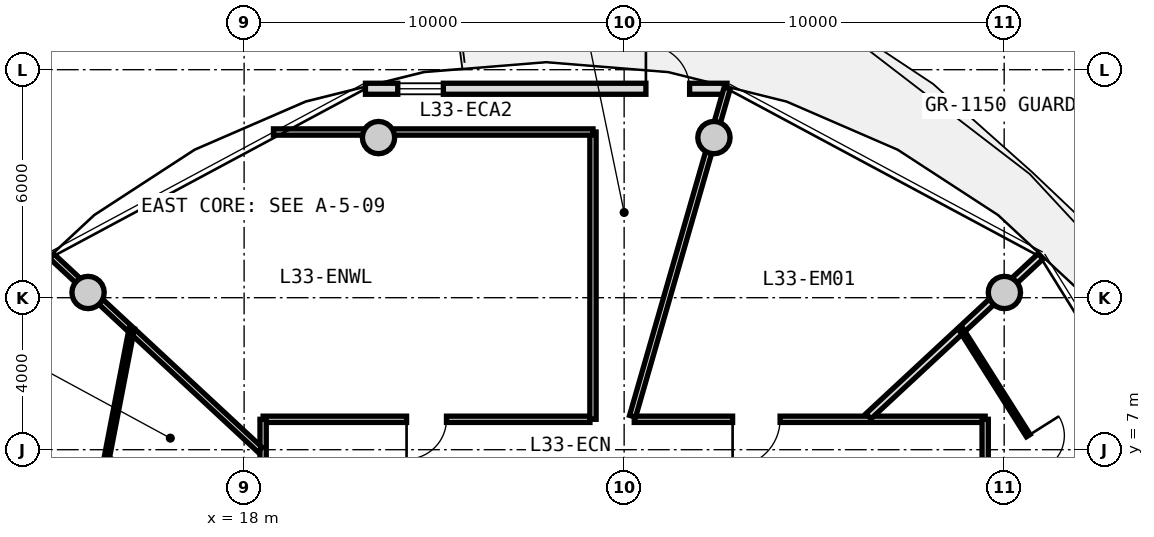
"""IFC4 building model, lengths in metres.
Left out: names, types, materials, properties, quantities, classifications, styles, units other than length and angle.
Written with IfcOpenShell. Run it as: python <this file> out.ifc"""

import sys

from ifc_helpers import new_model, si_unit, direction, frame, frame_2d, origin, origin_2d, place, context, subcontext, project, spatial, rectangle, circle, extrude, source, transform, mapped, element, fill, save


model = new_model("IFC4")
c1 = context("Model", 3, precision=1e-05, world=origin(), true_north=direction((0.0, 1.0)))
c2 = subcontext(c1, "Body", "Model", "MODEL_VIEW")
j1 = project(units=[si_unit("LENGTHUNIT", "METRE"), si_unit("PLANEANGLEUNIT", "RADIAN")], contexts=[c1])
p1 = place(None, origin())
s1 = spatial("IfcSite", under=j1, at=p1, CompositionType="ELEMENT")
p2 = place(p1, origin())
s2 = spatial("IfcBuilding", under=s1, at=p2, CompositionType="ELEMENT")
p3 = place(p2, frame((0.0, 0.0, 108.45)))
s3 = spatial("IfcBuildingStorey", under=s2, at=p3, CompositionType="ELEMENT", Elevation=108.45)
m1 = source(origin(), c2, "Body", "SweptSolid", [
    extrude(circle(Radius=0.425, at=origin_2d()), origin(), (0.0, 0.0, 1.0), 3.05),
])
for number, where, z_axis, x_axis in (
    (1, (38.006, 11.137, 0.0), (0.0, 0.0, 1.0), (1.0, 0.0, 0.0)),
    (2, (30.363, 15.213, 0.0), (0.0, 0.0, 1.0), (1.0, 0.0, 0.0)),
    (3, (21.537, 15.213, 0.0), (0.0, 0.0, 1.0), (1.0, 0.0, 0.0)),
    (4, (13.894, 11.137, 0.0), (0.0, 0.0, 1.0), (1.0, 0.0, 0.0)),
):
    element("IfcColumn", number, at=place(p3, frame(where, z_axis=z_axis, x_axis=x_axis)), inside=s3, PredefinedType="COLUMN", context=c2, shape_type="MappedRepresentation", body=[
        mapped(m1, transform((0.0, 0.0, 0.0), x_axis=(1.0, 0.0, 0.0), y_axis=(0.0, 1.0, 0.0), z_axis=(0.0, 0.0, 1.0), scale=1.0)),
    ])
m2 = source(origin(), c2, "Body", "SweptSolid", [
    extrude(rectangle(XDim=9.514, YDim=0.29, at=frame_2d((4.757, 0.0))), origin(), (0.0, 0.0, 1.0), 2.79),
])
p4 = place(p3, frame((21.193, 16.498, 0.0), z_axis=(0.0, 0.0, 1.0), x_axis=(1.0, 0.0, 0.0)))
e5 = element("IfcWall", 5, at=p4, inside=s3, PredefinedType="SOLIDWALL", context=c2, shape_type="MappedRepresentation", body=[
    mapped(m2, transform((0.0, 0.0, 0.0), x_axis=(1.0, 0.0, 0.0), y_axis=(0.0, 1.0, 0.0), z_axis=(0.0, 0.0, 1.0), scale=1.0)),
])
p5 = place(p4, frame((7.38, 0.0, 0.0)))
e6 = element("IfcOpeningElement", 6, at=p5, cuts=e5, PredefinedType="OPENING", context=c2, shape_type="SweptSolid", body=[
    extrude(rectangle(XDim=1.15, YDim=2.25, at=frame_2d((0.575, 1.125))), frame((0.0, 0.155, 0.0), z_axis=(0.0, -1.0, 0.0), x_axis=(1.0, 0.0, 0.0)), (0.0, 0.0, 1.0), 0.31),
])
p6 = place(p4, frame((0.85, 0.0, 0.85)))
e7 = element("IfcOpeningElement", 7, at=p6, cuts=e5, PredefinedType="OPENING", context=c2, shape_type="SweptSolid", body=[
    extrude(rectangle(XDim=1.2, YDim=1.5, at=frame_2d((0.6, 0.75))), frame((0.0, 0.155, 0.0), z_axis=(0.0, -1.0, 0.0), x_axis=(1.0, 0.0, 0.0)), (0.0, 0.0, 1.0), 0.31),
])
m3 = source(origin(), c2, "Body", "SweptSolid", [
    extrude(rectangle(XDim=8.6, YDim=0.165, at=frame_2d((4.3, 0.0))), origin(), (0.0, 0.0, 1.0), 2.775),
])
p7 = place(p3, frame((18.5, 7.8, 0.0), z_axis=(0.0, 0.0, 1.0), x_axis=(1.0, 0.0, 0.0)))
e8 = element("IfcWall", 8, at=p7, inside=s3, PredefinedType="PARTITIONING", context=c2, shape_type="MappedRepresentation", body=[
    mapped(m3, transform((0.0, 0.0, 0.0), x_axis=(1.0, 0.0, 0.0), y_axis=(0.0, 1.0, 0.0), z_axis=(0.0, 0.0, 1.0), scale=1.0)),
])
p8 = place(p7, frame((3.775, 0.0, 0.0)))
e9 = element("IfcOpeningElement", 9, at=p8, cuts=e8, PredefinedType="OPENING", context=c2, shape_type="SweptSolid", body=[
    extrude(rectangle(XDim=1.05, YDim=2.15, at=frame_2d((0.525, 1.075))), frame((0.0, 0.093, 0.0), z_axis=(0.0, -1.0, 0.0), x_axis=(1.0, 0.0, 0.0)), (0.0, 0.0, 1.0), 0.185),
])
m4 = source(origin(), c2, "Body", "SweptSolid", [
    extrude(rectangle(XDim=9.234, YDim=0.165, at=frame_2d((4.617, 0.0))), origin(), (0.0, 0.0, 1.0), 2.775),
])
p9 = place(p3, frame((28.266, 7.8, 0.0), z_axis=(0.0, 0.0, 1.0), x_axis=(1.0, 0.0, 0.0)))
e10 = element("IfcWall", 10, at=p9, inside=s3, PredefinedType="PARTITIONING", context=c2, shape_type="MappedRepresentation", body=[
    mapped(m4, transform((0.0, 0.0, 0.0), x_axis=(1.0, 0.0, 0.0), y_axis=(0.0, 1.0, 0.0), z_axis=(0.0, 0.0, 1.0), scale=1.0)),
])
p10 = place(p9, frame((2.588, 0.0, 0.0)))
e11 = element("IfcOpeningElement", 11, at=p10, cuts=e10, PredefinedType="OPENING", context=c2, shape_type="SweptSolid", body=[
    extrude(rectangle(XDim=1.25, YDim=2.2, at=frame_2d((0.625, 1.1))), frame((0.0, 0.093, 0.0), z_axis=(0.0, -1.0, 0.0), x_axis=(1.0, 0.0, 0.0)), (0.0, 0.0, 1.0), 0.185),
])
m5 = source(origin(), c2, "Body", "SweptSolid", [
    extrude(rectangle(XDim=15.6, YDim=0.165, at=frame_2d((7.8, 0.0))), origin(), (0.0, 0.0, 1.0), 2.775),
])
p11 = place(p3, frame((18.5, -7.8, 0.0), z_axis=(0.0, 0.0, 1.0), x_axis=(0.0, 1.0, 0.0)))
e12 = element("IfcWall", 12, at=p11, inside=s3, PredefinedType="PARTITIONING", context=c2, shape_type="MappedRepresentation", body=[
    mapped(m5, transform((0.0, 0.0, 0.0), x_axis=(1.0, 0.0, 0.0), y_axis=(0.0, 1.0, 0.0), z_axis=(0.0, 0.0, 1.0), scale=1.0)),
])
p12 = place(p11, frame((10.383, 0.0, 0.0)))
e13 = element("IfcOpeningElement", 13, at=p12, cuts=e12, PredefinedType="OPENING", context=c2, shape_type="SweptSolid", body=[
    extrude(rectangle(XDim=1.05, YDim=2.15, at=frame_2d((0.525, 1.075))), frame((0.0, 0.093, 0.0), z_axis=(0.0, -1.0, 0.0), x_axis=(1.0, 0.0, 0.0)), (0.0, 0.0, 1.0), 0.185),
])
p13 = place(p11, frame((6.419, 0.0, 0.0)))
e14 = element("IfcOpeningElement", 14, at=p13, cuts=e12, PredefinedType="OPENING", context=c2, shape_type="SweptSolid", body=[
    extrude(rectangle(XDim=1.05, YDim=2.15, at=frame_2d((0.525, 1.075))), frame((0.0, 0.093, 0.0), z_axis=(0.0, -1.0, 0.0), x_axis=(1.0, 0.0, 0.0)), (0.0, 0.0, 1.0), 0.185),
])
p14 = place(p11, frame((1.821, 0.0, 0.0)))
e15 = element("IfcOpeningElement", 15, at=p14, cuts=e12, PredefinedType="OPENING", context=c2, shape_type="SweptSolid", body=[
    extrude(rectangle(XDim=1.05, YDim=2.15, at=frame_2d((0.525, 1.075))), frame((0.0, 0.093, 0.0), z_axis=(0.0, -1.0, 0.0), x_axis=(1.0, 0.0, 0.0)), (0.0, 0.0, 1.0), 0.185),
])
p15 = place(p3, frame((37.5, 7.8, 0.0), z_axis=(0.0, 0.0, 1.0), x_axis=(0.0, -1.0, 0.0)))
e16 = element("IfcWall", 16, at=p15, inside=s3, PredefinedType="PARTITIONING", context=c2, shape_type="MappedRepresentation", body=[
    mapped(m5, transform((0.0, 0.0, 0.0), x_axis=(1.0, 0.0, 0.0), y_axis=(0.0, 1.0, 0.0), z_axis=(0.0, 0.0, 1.0), scale=1.0)),
])
p16 = place(p15, frame((6.87, 0.0, 0.0)))
e17 = element("IfcOpeningElement", 17, at=p16, cuts=e16, PredefinedType="OPENING", context=c2, shape_type="SweptSolid", body=[
    extrude(rectangle(XDim=1.05, YDim=2.15, at=frame_2d((0.525, 1.075))), frame((0.0, 0.093, 0.0), z_axis=(0.0, -1.0, 0.0), x_axis=(1.0, 0.0, 0.0)), (0.0, 0.0, 1.0), 0.185),
])
m6 = source(origin(), c2, "Body", "SweptSolid", [
    extrude(rectangle(XDim=8.989, YDim=0.165, at=frame_2d((4.495, 0.0))), origin(), (0.0, 0.0, 1.0), 2.275),
])
p17 = place(p3, frame((28.222, 7.88, 0.0), z_axis=(0.0, 0.0, 1.0), x_axis=(0.27702323008, 0.960863221274, 0.0)))
e18 = element("IfcWall", 18, at=p17, inside=s3, PredefinedType="PARTITIONING", context=c2, shape_type="MappedRepresentation", body=[
    mapped(m6, transform((0.0, 0.0, 0.0), x_axis=(1.0, 0.0, 0.0), y_axis=(0.0, 1.0, 0.0), z_axis=(0.0, 0.0, 1.0), scale=1.0)),
])
m7 = source(origin(), c2, "Body", "SweptSolid", [
    extrude(rectangle(XDim=7.482, YDim=0.165, at=frame_2d((3.741, 0.0))), origin(), (0.0, 0.0, 1.0), 2.275),
])
p18 = place(p3, frame((18.42, 6.998, 0.0), z_axis=(0.0, 0.0, 1.0), x_axis=(-0.732508698043, 0.680757671489, 0.0)))
e19 = element("IfcWall", 19, at=p18, inside=s3, PredefinedType="PARTITIONING", context=c2, shape_type="MappedRepresentation", body=[
    mapped(m7, transform((0.0, 0.0, 0.0), x_axis=(1.0, 0.0, 0.0), y_axis=(0.0, 1.0, 0.0), z_axis=(0.0, 0.0, 1.0), scale=1.0)),
])
m8 = source(origin(), c2, "Body", "SweptSolid", [
    extrude(rectangle(XDim=7.56, YDim=0.165, at=frame_2d((3.78, 0.0))), origin(), (0.0, 0.0, 1.0), 2.775),
])
p19 = place(p3, frame((27.18, 7.8, 0.0), z_axis=(0.0, 0.0, 1.0), x_axis=(0.0, 1.0, 0.0)))
e20 = element("IfcWall", 20, at=p19, inside=s3, PredefinedType="PARTITIONING", context=c2, shape_type="MappedRepresentation", body=[
    mapped(m8, transform((0.0, 0.0, 0.0), x_axis=(1.0, 0.0, 0.0), y_axis=(0.0, 1.0, 0.0), z_axis=(0.0, 0.0, 1.0), scale=1.0)),
])
m9 = source(origin(), c2, "Body", "SweptSolid", [
    extrude(rectangle(XDim=8.407, YDim=0.165, at=frame_2d((4.204, 0.0))), origin(), (0.0, 0.0, 1.0), 2.275),
])
p20 = place(p3, frame((18.773, 15.36, 0.0), z_axis=(0.0, 0.0, 1.0), x_axis=(1.0, 0.0, 0.0)))
e21 = element("IfcWall", 21, at=p20, inside=s3, PredefinedType="PARTITIONING", context=c2, shape_type="MappedRepresentation", body=[
    mapped(m9, transform((0.0, 0.0, 0.0), x_axis=(1.0, 0.0, 0.0), y_axis=(0.0, 1.0, 0.0), z_axis=(0.0, 0.0, 1.0), scale=1.0)),
])
m10 = source(origin(), c2, "Body", "SweptSolid", [
    extrude(rectangle(XDim=4.735, YDim=0.14, at=frame_2d((2.368, 0.0))), origin(), (0.0, 0.0, 1.0), 2.775),
])
p21 = place(p3, frame((18.47, 4.368, 0.0), z_axis=(0.0, 0.0, 1.0), x_axis=(-0.863537576642, 0.504284496814, 0.0)))
e22 = element("IfcWall", 22, at=p21, inside=s3, PredefinedType="PARTITIONING", context=c2, shape_type="MappedRepresentation", body=[
    mapped(m10, transform((0.0, 0.0, 0.0), x_axis=(1.0, 0.0, 0.0), y_axis=(0.0, 1.0, 0.0), z_axis=(0.0, 0.0, 1.0), scale=1.0)),
])
p22 = place(p21, frame((1.908, 0.0, 0.0)))
e23 = element("IfcOpeningElement", 23, at=p22, cuts=e22, PredefinedType="OPENING", context=c2, shape_type="SweptSolid", body=[
    extrude(rectangle(XDim=0.92, YDim=2.1, at=frame_2d((0.46, 1.05))), frame((0.0, 0.08, 0.0), z_axis=(0.0, -1.0, 0.0), x_axis=(1.0, 0.0, 0.0)), (0.0, 0.0, 1.0), 0.16),
])
m11 = source(origin(), c2, "Body", "SweptSolid", [
    extrude(rectangle(XDim=3.499, YDim=0.14, at=frame_2d((1.75, 0.0))), origin(), (0.0, 0.0, 1.0), 2.775),
])
p23 = place(p3, frame((14.381, 6.756, 0.0), z_axis=(0.0, 0.0, 1.0), x_axis=(0.18957713629, 0.981865830649, 0.0)))
e24 = element("IfcWall", 24, at=p23, inside=s3, PredefinedType="PARTITIONING", context=c2, shape_type="MappedRepresentation", body=[
    mapped(m11, transform((0.0, 0.0, 0.0), x_axis=(1.0, 0.0, 0.0), y_axis=(0.0, 1.0, 0.0), z_axis=(0.0, 0.0, 1.0), scale=1.0)),
])
m12 = source(origin(), c2, "Body", "SweptSolid", [
    extrude(rectangle(XDim=6.187, YDim=0.19, at=frame_2d((3.093, 0.0))), origin(), (0.0, 0.0, 1.0), 2.275),
])
p24 = place(p3, frame((34.429, 7.88, 0.0), z_axis=(0.0, 0.0, 1.0), x_axis=(0.732501077882, 0.680765870841, 0.0)))
e25 = element("IfcWall", 25, at=p24, inside=s3, PredefinedType="PARTITIONING", context=c2, shape_type="MappedRepresentation", body=[
    mapped(m12, transform((0.0, 0.0, 0.0), x_axis=(1.0, 0.0, 0.0), y_axis=(0.0, 1.0, 0.0), z_axis=(0.0, 0.0, 1.0), scale=1.0)),
])
m13 = source(origin(), c2, "Body", "SweptSolid", [
    extrude(rectangle(XDim=7.618, YDim=0.115, at=frame_2d((3.809, 0.0))), origin(), (0.0, 0.0, 1.0), 2.775),
])
p25 = place(p3, frame((40.923, 3.749, 0.0), z_axis=(0.0, 0.0, 1.0), x_axis=(-0.534316104929, 0.845284744931, 0.0)))
e26 = element("IfcWall", 26, at=p25, inside=s3, PredefinedType="PARTITIONING", context=c2, shape_type="MappedRepresentation", body=[
    mapped(m13, transform((0.0, 0.0, 0.0), x_axis=(1.0, 0.0, 0.0), y_axis=(0.0, 1.0, 0.0), z_axis=(0.0, 0.0, 1.0), scale=1.0)),
])
p26 = place(p25, frame((3.334, 0.0, 0.0)))
e27 = element("IfcOpeningElement", 27, at=p26, cuts=e26, PredefinedType="OPENING", context=c2, shape_type="SweptSolid", body=[
    extrude(rectangle(XDim=0.95, YDim=2.1, at=frame_2d((0.475, 1.05))), frame((0.0, 0.067, 0.0), z_axis=(0.0, -1.0, 0.0), x_axis=(1.0, 0.0, 0.0)), (0.0, 0.0, 1.0), 0.135),
])
m14 = source(origin(), c2, "Body", "SweptSolid", [
    extrude(rectangle(XDim=1.15, YDim=2.25, at=frame_2d((0.575, 1.125))), frame((0.0, 0.025, 0.0), z_axis=(0.0, -1.0, 0.0), x_axis=(1.0, 0.0, 0.0)), (0.0, 0.0, 1.0), 0.05),
])
p27 = place(p5, origin())
e28 = element("IfcDoor", 28, at=p27, inside=s3, OperationType="SINGLE_SWING_LEFT", PredefinedType="DOOR", context=c2, shape_type="MappedRepresentation", body=[
    mapped(m14, transform((0.0, 0.0, 0.0), x_axis=(1.0, 0.0, 0.0), y_axis=(0.0, 1.0, 0.0), z_axis=(0.0, 0.0, 1.0), scale=1.0)),
])
fill(e6, e28)
m15 = source(origin(), c2, "Body", "SweptSolid", [
    extrude(rectangle(XDim=1.2, YDim=1.5, at=frame_2d((0.6, 0.75))), frame((0.0, 0.03, 0.0), z_axis=(0.0, -1.0, 0.0), x_axis=(1.0, 0.0, 0.0)), (0.0, 0.0, 1.0), 0.06),
])
p28 = place(p6, origin())
e29 = element("IfcWindow", 29, at=p28, inside=s3, PartitioningType="SINGLE_PANEL", PredefinedType="WINDOW", context=c2, shape_type="MappedRepresentation", body=[
    mapped(m15, transform((0.0, 0.0, 0.0), x_axis=(1.0, 0.0, 0.0), y_axis=(0.0, 1.0, 0.0), z_axis=(0.0, 0.0, 1.0), scale=1.0)),
])
fill(e7, e29)
m16 = source(origin(), c2, "Body", "SweptSolid", [
    extrude(rectangle(XDim=1.05, YDim=2.15, at=frame_2d((0.525, 1.075))), frame((0.0, 0.025, 0.0), z_axis=(0.0, -1.0, 0.0), x_axis=(1.0, 0.0, 0.0)), (0.0, 0.0, 1.0), 0.05),
])
p29 = place(p8, frame((1.05, 0.0, 0.0), z_axis=(0.0, 0.0, 1.0), x_axis=(-1.0, 0.0, 0.0)))
e30 = element("IfcDoor", 30, at=p29, inside=s3, OperationType="SINGLE_SWING_RIGHT", PredefinedType="DOOR", context=c2, shape_type="MappedRepresentation", body=[
    mapped(m16, transform((0.0, 0.0, 0.0), x_axis=(1.0, 0.0, 0.0), y_axis=(0.0, 1.0, 0.0), z_axis=(0.0, 0.0, 1.0), scale=1.0)),
])
fill(e9, e30)
m17 = source(origin(), c2, "Body", "SweptSolid", [
    extrude(rectangle(XDim=0.95, YDim=2.1, at=frame_2d((0.475, 1.05))), frame((0.0, 0.025, 0.0), z_axis=(0.0, -1.0, 0.0), x_axis=(1.0, 0.0, 0.0)), (0.0, 0.0, 1.0), 0.05),
])
p30 = place(p26, frame((0.95, 0.0, 0.0), z_axis=(0.0, 0.0, 1.0), x_axis=(-1.0, 0.0, 0.0)))
e31 = element("IfcDoor", 31, at=p30, inside=s3, OperationType="SINGLE_SWING_LEFT", PredefinedType="DOOR", context=c2, shape_type="MappedRepresentation", body=[
    mapped(m17, transform((0.0, 0.0, 0.0), x_axis=(1.0, 0.0, 0.0), y_axis=(0.0, 1.0, 0.0), z_axis=(0.0, 0.0, 1.0), scale=1.0)),
])
fill(e27, e31)
m18 = source(origin(), c2, "Body", "SweptSolid", [
    extrude(rectangle(XDim=1.25, YDim=2.2, at=frame_2d((0.625, 1.1))), frame((0.0, 0.025, 0.0), z_axis=(0.0, -1.0, 0.0), x_axis=(1.0, 0.0, 0.0)), (0.0, 0.0, 1.0), 0.05),
])
p31 = place(p10, frame((1.25, 0.0, 0.0), z_axis=(0.0, 0.0, 1.0), x_axis=(-1.0, 0.0, 0.0)))
e32 = element("IfcDoor", 32, at=p31, inside=s3, OperationType="SINGLE_SWING_RIGHT", PredefinedType="DOOR", context=c2, shape_type="MappedRepresentation", body=[
    mapped(m18, transform((0.0, 0.0, 0.0), x_axis=(1.0, 0.0, 0.0), y_axis=(0.0, 1.0, 0.0), z_axis=(0.0, 0.0, 1.0), scale=1.0)),
])
fill(e11, e32)
save(model, sys.argv[1])
